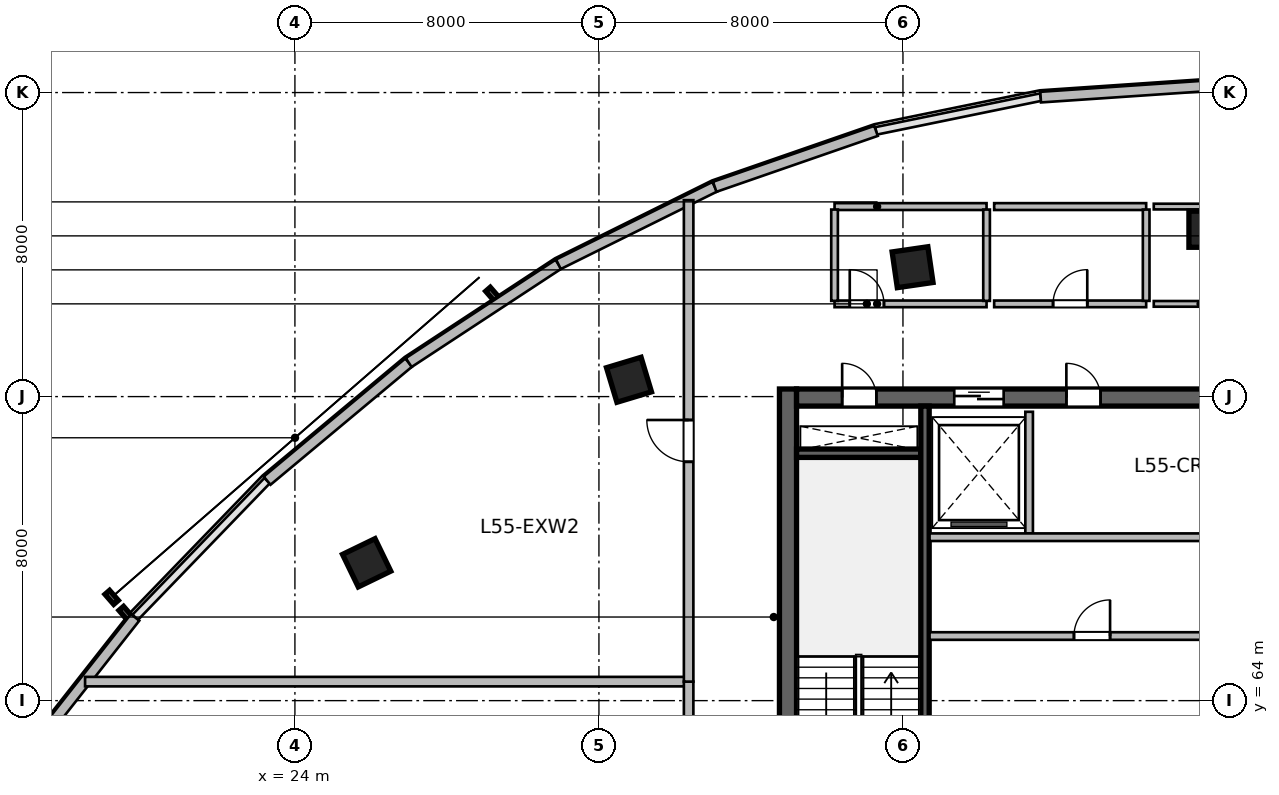
"""IFC4 building model, lengths in metres.
Left out: names, types, materials, properties, quantities, classifications, styles, units other than length and angle.
Written with IfcOpenShell. Run it as: python <this file> out.ifc"""

import sys

from ifc_helpers import new_model, si_unit, direction, frame, frame_2d, origin, origin_2d, place, context, subcontext, project, spatial, rectangle, extrude, source, transform, mapped, element, fill, save


model = new_model("IFC4")
c1 = context("Model", 3, precision=1e-05, world=origin(), true_north=direction((0.0, 1.0)))
c2 = subcontext(c1, "Body", "Model", "MODEL_VIEW")
j1 = project(units=[si_unit("LENGTHUNIT", "METRE"), si_unit("PLANEANGLEUNIT", "RADIAN")], contexts=[c1])
p1 = place(None, origin())
s1 = spatial("IfcSite", under=j1, at=p1, CompositionType="ELEMENT")
p2 = place(p1, origin())
s2 = spatial("IfcBuilding", under=s1, at=p2, CompositionType="ELEMENT")
p3 = place(p2, frame((0.0, 0.0, 227.4)))
s3 = spatial("IfcBuildingStorey", under=s2, at=p3, CompositionType="ELEMENT", Elevation=227.4)
m1 = source(origin(), c2, "Body", "SweptSolid", [
    extrude(rectangle(XDim=12.0, YDim=0.45, at=frame_2d((6.0, 0.0))), origin(), (0.0, 0.0, 1.0), 3.9),
])
p4 = place(p3, frame((36.975, 60.2, 0.0), z_axis=(0.0, 0.0, 1.0), x_axis=(0.0, 1.0, 0.0)))
e1 = element("IfcWall", 1, at=p4, inside=s3, PredefinedType="SHEAR", context=c2, shape_type="MappedRepresentation", body=[
    mapped(m1, transform((0.0, 0.0, 0.0), scale=1.0)),
])
m2 = source(origin(), c2, "Body", "SweptSolid", [
    extrude(rectangle(XDim=21.6, YDim=0.45, at=frame_2d((10.8, 0.0))), origin(), (0.0, 0.0, 1.0), 3.9),
])
p5 = place(p3, frame((37.2, 71.975, 0.0), z_axis=(0.0, 0.0, 1.0), x_axis=(1.0, 0.0, 0.0)))
e2 = element("IfcWall", 2, at=p5, inside=s3, PredefinedType="SHEAR", context=c2, shape_type="MappedRepresentation", body=[
    mapped(m2, transform((0.0, 0.0, 0.0), scale=1.0)),
])
p6 = place(p5, frame((1.2, 0.0, 0.0)))
e3 = element("IfcOpeningElement", 3, at=p6, cuts=e2, PredefinedType="OPENING", context=c2, shape_type="SweptSolid", body=[
    extrude(rectangle(XDim=0.9, YDim=2.1, at=frame_2d((0.45, 1.05))), frame((0.0, 0.235, 0.0), z_axis=(0.0, -1.0, 0.0), x_axis=(1.0, 0.0, 0.0)), (0.0, 0.0, 1.0), 0.47),
])
p7 = place(p5, frame((14.7, 0.0, 0.0)))
e4 = element("IfcOpeningElement", 4, at=p7, cuts=e2, PredefinedType="OPENING", context=c2, shape_type="SweptSolid", body=[
    extrude(rectangle(XDim=1.2, YDim=2.15, at=frame_2d((0.6, 1.075))), frame((0.0, 0.235, 0.0), z_axis=(0.0, -1.0, 0.0), x_axis=(1.0, 0.0, 0.0)), (0.0, 0.0, 1.0), 0.47),
])
p8 = place(p5, frame((4.15, 0.0, 0.0)))
e5 = element("IfcOpeningElement", 5, at=p8, cuts=e2, PredefinedType="OPENING", context=c2, shape_type="SweptSolid", body=[
    extrude(rectangle(XDim=1.3, YDim=2.15, at=frame_2d((0.65, 1.075))), frame((0.0, 0.235, 0.0), z_axis=(0.0, -1.0, 0.0), x_axis=(1.0, 0.0, 0.0)), (0.0, 0.0, 1.0), 0.47),
])
p9 = place(p5, frame((7.1, 0.0, 0.0)))
e6 = element("IfcOpeningElement", 6, at=p9, cuts=e2, PredefinedType="OPENING", context=c2, shape_type="SweptSolid", body=[
    extrude(rectangle(XDim=0.9, YDim=2.1, at=frame_2d((0.45, 1.05))), frame((0.0, 0.235, 0.0), z_axis=(0.0, -1.0, 0.0), x_axis=(1.0, 0.0, 0.0)), (0.0, 0.0, 1.0), 0.47),
])
m3 = source(origin(), c2, "Body", "SweptSolid", [
    extrude(rectangle(XDim=3.27, YDim=0.22, at=frame_2d((1.635, 0.0))), origin(), (0.0, 0.0, 1.0), 3.9),
])
p10 = place(p3, frame((37.2, 70.51, 0.0), z_axis=(0.0, 0.0, 1.0), x_axis=(1.0, 0.0, 0.0)))
e7 = element("IfcWall", 7, at=p10, inside=s3, PredefinedType="SHEAR", context=c2, shape_type="MappedRepresentation", body=[
    mapped(m3, transform((0.0, 0.0, 0.0), scale=1.0)),
])
m4 = source(origin(), c2, "Body", "SweptSolid", [
    extrude(rectangle(XDim=11.1, YDim=0.22, at=frame_2d((5.55, 0.0))), origin(), (0.0, 0.0, 1.0), 3.9),
])
p11 = place(p3, frame((40.58, 60.65, 0.0), z_axis=(0.0, 0.0, 1.0), x_axis=(0.0, 1.0, 0.0)))
e8 = element("IfcWall", 8, at=p11, inside=s3, PredefinedType="SHEAR", context=c2, shape_type="MappedRepresentation", body=[
    mapped(m4, transform((0.0, 0.0, 0.0), scale=1.0)),
])
m5 = source(origin(), c2, "Body", "SweptSolid", [
    extrude(rectangle(XDim=0.95, YDim=0.95, at=origin_2d()), origin(), (0.0, 0.0, 1.0), 3.9),
])
for number, where, z_axis, x_axis in (
    (9, (25.888, 67.627, 0.0), (0.0, 0.0, 1.0), (-0.436, 0.9, 0.0)),
    (10, (32.791, 72.442, 0.0), (0.0, 0.0, 1.0), (-0.289, 0.957, 0.0)),
    (11, (40.253, 75.404, 0.0), (0.0, 0.0, 1.0), (-0.143, 0.99, 0.0)),
    (12, (48.0, 76.404, 0.0), (0.0, 0.0, 1.0), (0.0, 1.0, 0.0)),
):
    element("IfcColumn", number, at=place(p3, frame(where, z_axis=z_axis, x_axis=x_axis)), inside=s3, PredefinedType="COLUMN", context=c2, shape_type="MappedRepresentation", body=[
        mapped(m5, transform((0.0, 0.0, 0.0), scale=1.0)),
    ])
m6 = source(origin(), c2, "Body", "SweptSolid", [
    extrude(rectangle(XDim=5.153, YDim=0.28, at=frame_2d((2.577, 0.0))), origin(), (0.0, 0.0, 1.0), 3.65),
])
p12 = place(p3, frame((16.609, 62.14, 0.0), z_axis=(0.0, 0.0, 1.0), x_axis=(0.618179283891, 0.786037132054, 0.0)))
e13 = element("IfcWall", 13, at=p12, inside=s3, PredefinedType="SOLIDWALL", context=c2, shape_type="MappedRepresentation", body=[
    mapped(m6, transform((0.0, 0.0, 0.0), scale=1.0)),
])
m7 = source(origin(), c2, "Body", "SweptSolid", [
    extrude(rectangle(XDim=4.852, YDim=0.28, at=frame_2d((2.426, 0.0))), origin(), (0.0, 0.0, 1.0), 3.65),
])
p13 = place(p3, frame((23.268, 69.788, 0.0), z_axis=(0.0, 0.0, 1.0), x_axis=(0.767936605821, 0.640525853843, 0.0)))
e14 = element("IfcWall", 14, at=p13, inside=s3, PredefinedType="SOLIDWALL", context=c2, shape_type="MappedRepresentation", body=[
    mapped(m7, transform((0.0, 0.0, 0.0), scale=1.0)),
])
m8 = source(origin(), c2, "Body", "SweptSolid", [
    extrude(rectangle(XDim=4.713, YDim=0.28, at=frame_2d((2.356, 0.0))), origin(), (0.0, 0.0, 1.0), 3.65),
])
p14 = place(p3, frame((26.994, 72.896, 0.0), z_axis=(0.0, 0.0, 1.0), x_axis=(0.835974386457, 0.548768462275, 0.0)))
e15 = element("IfcWall", 15, at=p14, inside=s3, PredefinedType="SOLIDWALL", context=c2, shape_type="MappedRepresentation", body=[
    mapped(m8, transform((0.0, 0.0, 0.0), scale=1.0)),
])
m9 = source(origin(), c2, "Body", "SweptSolid", [
    extrude(rectangle(XDim=4.59, YDim=0.28, at=frame_2d((2.295, 0.0))), origin(), (0.0, 0.0, 1.0), 3.65),
])
p15 = place(p3, frame((30.934, 75.482, 0.0), z_axis=(0.0, 0.0, 1.0), x_axis=(0.895974834987, 0.444104824418, 0.0)))
e16 = element("IfcWall", 16, at=p15, inside=s3, PredefinedType="SOLIDWALL", context=c2, shape_type="MappedRepresentation", body=[
    mapped(m9, transform((0.0, 0.0, 0.0), scale=1.0)),
])
m10 = source(origin(), c2, "Body", "SweptSolid", [
    extrude(rectangle(XDim=4.492, YDim=0.28, at=frame_2d((2.246, 0.0))), origin(), (0.0, 0.0, 1.0), 3.65),
])
p16 = place(p3, frame((35.046, 77.52, 0.0), z_axis=(0.0, 0.0, 1.0), x_axis=(0.944872297412, 0.32743906545, 0.0)))
e17 = element("IfcWall", 17, at=p16, inside=s3, PredefinedType="SOLIDWALL", context=c2, shape_type="MappedRepresentation", body=[
    mapped(m10, transform((0.0, 0.0, 0.0), scale=1.0)),
])
m11 = source(origin(), c2, "Body", "SweptSolid", [
    extrude(rectangle(XDim=4.387, YDim=0.28, at=frame_2d((2.193, 0.0))), origin(), (0.0, 0.0, 1.0), 3.65),
])
p17 = place(p3, frame((43.623, 79.879, 0.0), z_axis=(0.0, 0.0, 1.0), x_axis=(0.997703650546, 0.06773053733, 0.0)))
e18 = element("IfcWall", 18, at=p17, inside=s3, PredefinedType="SOLIDWALL", context=c2, shape_type="MappedRepresentation", body=[
    mapped(m11, transform((0.0, 0.0, 0.0), scale=1.0)),
])
m12 = source(origin(), c2, "Body", "SweptSolid", [
    extrude(rectangle(XDim=3.2, YDim=0.2, at=frame_2d((1.6, 0.0))), origin(), (0.0, 0.0, 1.0), 3.65),
])
p18 = place(p3, frame((43.32, 68.4, 0.0), z_axis=(0.0, 0.0, 1.0), x_axis=(0.0, 1.0, 0.0)))
e19 = element("IfcWall", 19, at=p18, inside=s3, PredefinedType="SOLIDWALL", context=c2, shape_type="MappedRepresentation", body=[
    mapped(m12, transform((0.0, 0.0, 0.0), scale=1.0)),
])
m13 = source(origin(), c2, "Body", "SweptSolid", [
    extrude(rectangle(XDim=8.8, YDim=0.2, at=frame_2d((4.4, 0.0))), origin(), (0.0, 0.0, 1.0), 3.65),
])
p19 = place(p3, frame((40.7, 68.3, 0.0), z_axis=(0.0, 0.0, 1.0), x_axis=(1.0, 0.0, 0.0)))
e20 = element("IfcWall", 20, at=p19, inside=s3, PredefinedType="SOLIDWALL", context=c2, shape_type="MappedRepresentation", body=[
    mapped(m13, transform((0.0, 0.0, 0.0), scale=1.0)),
])
p20 = place(p3, frame((40.7, 65.7, 0.0), z_axis=(0.0, 0.0, 1.0), x_axis=(1.0, 0.0, 0.0)))
e21 = element("IfcWall", 21, at=p20, inside=s3, PredefinedType="SOLIDWALL", context=c2, shape_type="MappedRepresentation", body=[
    mapped(m13, transform((0.0, 0.0, 0.0), scale=1.0)),
])
p21 = place(p20, frame((3.8, 0.0, 0.0)))
e22 = element("IfcOpeningElement", 22, at=p21, cuts=e21, PredefinedType="OPENING", context=c2, shape_type="SweptSolid", body=[
    extrude(rectangle(XDim=0.95, YDim=2.15, at=frame_2d((0.475, 1.075))), frame((0.0, 0.11, 0.0), z_axis=(0.0, -1.0, 0.0), x_axis=(1.0, 0.0, 0.0)), (0.0, 0.0, 1.0), 0.22),
])
m14 = source(origin(), c2, "Body", "SweptSolid", [
    extrude(rectangle(XDim=4.0, YDim=0.175, at=frame_2d((2.0, 0.0))), origin(), (0.0, 0.0, 1.0), 3.65),
])
p22 = place(p3, frame((38.2, 74.44, 0.0), z_axis=(0.0, 0.0, 1.0), x_axis=(1.0, 0.0, 0.0)))
e23 = element("IfcWall", 23, at=p22, inside=s3, PredefinedType="PARTITIONING", context=c2, shape_type="MappedRepresentation", body=[
    mapped(m14, transform((0.0, 0.0, 0.0), scale=1.0)),
])
p23 = place(p22, frame((0.4, 0.0, 0.0)))
e24 = element("IfcOpeningElement", 24, at=p23, cuts=e23, PredefinedType="OPENING", context=c2, shape_type="SweptSolid", body=[
    extrude(rectangle(XDim=0.9, YDim=2.08, at=frame_2d((0.45, 1.04))), frame((0.0, 0.098, 0.0), z_axis=(0.0, -1.0, 0.0), x_axis=(1.0, 0.0, 0.0)), (0.0, 0.0, 1.0), 0.195),
])
m15 = source(origin(), c2, "Body", "SweptSolid", [
    extrude(rectangle(XDim=4.0, YDim=0.18, at=frame_2d((2.0, 0.0))), origin(), (0.0, 0.0, 1.0), 3.65),
])
p24 = place(p3, frame((38.2, 77.0, 0.0), z_axis=(0.0, 0.0, 1.0), x_axis=(1.0, 0.0, 0.0)))
e25 = element("IfcWall", 25, at=p24, inside=s3, PredefinedType="PLUMBINGWALL", context=c2, shape_type="MappedRepresentation", body=[
    mapped(m15, transform((0.0, 0.0, 0.0), scale=1.0)),
])
m16 = source(origin(), c2, "Body", "SweptSolid", [
    extrude(rectangle(XDim=2.403, YDim=0.175, at=frame_2d((1.201, 0.0))), origin(), (0.0, 0.0, 1.0), 3.65),
])
for number, where, z_axis, x_axis in (
    (26, (38.2, 74.519, 0.0), (0.0, 0.0, 1.0), (0.0, 1.0, 0.0)),
    (27, (42.2, 74.519, 0.0), (0.0, 0.0, 1.0), (0.0, 1.0, 0.0)),
):
    element("IfcWall", number, at=place(p3, frame(where, z_axis=z_axis, x_axis=x_axis)), inside=s3, PredefinedType="PARTITIONING", context=c2, shape_type="MappedRepresentation", body=[
        mapped(m16, transform((0.0, 0.0, 0.0), scale=1.0)),
    ])
p25 = place(p3, frame((42.4, 74.44, 0.0), z_axis=(0.0, 0.0, 1.0), x_axis=(1.0, 0.0, 0.0)))
e28 = element("IfcWall", 28, at=p25, inside=s3, PredefinedType="PARTITIONING", context=c2, shape_type="MappedRepresentation", body=[
    mapped(m14, transform((0.0, 0.0, 0.0), scale=1.0)),
])
p26 = place(p25, frame((1.55, 0.0, 0.0)))
e29 = element("IfcOpeningElement", 29, at=p26, cuts=e28, PredefinedType="OPENING", context=c2, shape_type="SweptSolid", body=[
    extrude(rectangle(XDim=0.9, YDim=2.08, at=frame_2d((0.45, 1.04))), frame((0.0, 0.098, 0.0), z_axis=(0.0, -1.0, 0.0), x_axis=(1.0, 0.0, 0.0)), (0.0, 0.0, 1.0), 0.195),
])
p27 = place(p3, frame((42.4, 77.0, 0.0), z_axis=(0.0, 0.0, 1.0), x_axis=(1.0, 0.0, 0.0)))
e30 = element("IfcWall", 30, at=p27, inside=s3, PredefinedType="PLUMBINGWALL", context=c2, shape_type="MappedRepresentation", body=[
    mapped(m15, transform((0.0, 0.0, 0.0), scale=1.0)),
])
p28 = place(p3, frame((46.4, 74.519, 0.0), z_axis=(0.0, 0.0, 1.0), x_axis=(0.0, 1.0, 0.0)))
e31 = element("IfcWall", 31, at=p28, inside=s3, PredefinedType="PARTITIONING", context=c2, shape_type="MappedRepresentation", body=[
    mapped(m16, transform((0.0, 0.0, 0.0), scale=1.0)),
])
m17 = source(origin(), c2, "Body", "SweptSolid", [
    extrude(rectangle(XDim=4.4, YDim=0.15, at=frame_2d((2.2, 0.0))), origin(), (0.0, 0.0, 1.0), 3.65),
])
p29 = place(p3, frame((46.6, 74.44, 0.0), z_axis=(0.0, 0.0, 1.0), x_axis=(1.0, 0.0, 0.0)))
e32 = element("IfcWall", 32, at=p29, inside=s3, PredefinedType="PARTITIONING", context=c2, shape_type="MappedRepresentation", body=[
    mapped(m17, transform((0.0, 0.0, 0.0), scale=1.0)),
])
p30 = place(p29, frame((1.725, 0.0, 0.0)))
e33 = element("IfcOpeningElement", 33, at=p30, cuts=e32, PredefinedType="OPENING", context=c2, shape_type="SweptSolid", body=[
    extrude(rectangle(XDim=0.95, YDim=2.1, at=frame_2d((0.475, 1.05))), frame((0.0, 0.085, 0.0), z_axis=(0.0, -1.0, 0.0), x_axis=(1.0, 0.0, 0.0)), (0.0, 0.0, 1.0), 0.17),
])
p31 = place(p3, frame((46.6, 77.0, 0.0), z_axis=(0.0, 0.0, 1.0), x_axis=(1.0, 0.0, 0.0)))
e34 = element("IfcWall", 34, at=p31, inside=s3, PredefinedType="PARTITIONING", context=c2, shape_type="MappedRepresentation", body=[
    mapped(m17, transform((0.0, 0.0, 0.0), scale=1.0)),
])
m18 = source(origin(), c2, "Body", "SweptSolid", [
    extrude(rectangle(XDim=15.882, YDim=0.25, at=frame_2d((7.941, 0.0))), origin(), (0.0, 0.0, 1.0), 3.65),
])
p32 = place(p3, frame((18.478, 64.5, 0.0), z_axis=(0.0, 0.0, 1.0), x_axis=(1.0, 0.0, 0.0)))
e35 = element("IfcWall", 35, at=p32, inside=s3, PredefinedType="PARTITIONING", context=c2, shape_type="MappedRepresentation", body=[
    mapped(m18, transform((0.0, 0.0, 0.0), scale=1.0)),
])
m19 = source(origin(), c2, "Body", "SweptSolid", [
    extrude(rectangle(XDim=6.54, YDim=0.25, at=frame_2d((3.27, 0.0))), origin(), (0.0, 0.0, 1.0), 3.65),
])
p33 = place(p3, frame((34.36, 57.96, 0.0), z_axis=(0.0, 0.0, 1.0), x_axis=(0.0, 1.0, 0.0)))
e36 = element("IfcWall", 36, at=p33, inside=s3, PredefinedType="PARTITIONING", context=c2, shape_type="MappedRepresentation", body=[
    mapped(m19, transform((0.0, 0.0, 0.0), scale=1.0)),
])
p34 = place(p33, frame((2.72, 0.0, 0.0)))
e37 = element("IfcOpeningElement", 37, at=p34, cuts=e36, PredefinedType="OPENING", context=c2, shape_type="SweptSolid", body=[
    extrude(rectangle(XDim=1.1, YDim=2.15, at=frame_2d((0.55, 1.075))), frame((0.0, 0.135, 0.0), z_axis=(0.0, -1.0, 0.0), x_axis=(1.0, 0.0, 0.0)), (0.0, 0.0, 1.0), 0.27),
])
m20 = source(origin(), c2, "Body", "SweptSolid", [
    extrude(rectangle(XDim=12.669, YDim=0.25, at=frame_2d((6.334, 0.0))), origin(), (0.0, 0.0, 1.0), 3.65),
])
p35 = place(p3, frame((34.36, 64.5, 0.0), z_axis=(0.0, 0.0, 1.0), x_axis=(0.0, 1.0, 0.0)))
e38 = element("IfcWall", 38, at=p35, inside=s3, PredefinedType="PARTITIONING", context=c2, shape_type="MappedRepresentation", body=[
    mapped(m20, transform((0.0, 0.0, 0.0), scale=1.0)),
])
p36 = place(p35, frame((5.784, 0.0, 0.0)))
e39 = element("IfcOpeningElement", 39, at=p36, cuts=e38, PredefinedType="OPENING", context=c2, shape_type="SweptSolid", body=[
    extrude(rectangle(XDim=1.1, YDim=2.15, at=frame_2d((0.55, 1.075))), frame((0.0, 0.135, 0.0), z_axis=(0.0, -1.0, 0.0), x_axis=(1.0, 0.0, 0.0)), (0.0, 0.0, 1.0), 0.27),
])
m21 = source(origin(), c2, "Body", "SweptSolid", [
    extrude(rectangle(XDim=0.9, YDim=2.1, at=frame_2d((0.45, 1.05))), frame((0.0, 0.025, 0.0), z_axis=(0.0, -1.0, 0.0), x_axis=(1.0, 0.0, 0.0)), (0.0, 0.0, 1.0), 0.05),
])
p37 = place(p6, origin())
e40 = element("IfcDoor", 40, at=p37, inside=s3, OperationType="SINGLE_SWING_LEFT", PredefinedType="DOOR", context=c2, shape_type="MappedRepresentation", body=[
    mapped(m21, transform((0.0, 0.0, 0.0), scale=1.0)),
])
fill(e3, e40)
m22 = source(origin(), c2, "Body", "SweptSolid", [
    extrude(rectangle(XDim=1.3, YDim=2.15, at=frame_2d((0.65, 1.075))), frame((0.0, 0.025, 0.0), z_axis=(0.0, -1.0, 0.0), x_axis=(1.0, 0.0, 0.0)), (0.0, 0.0, 1.0), 0.05),
])
p38 = place(p8, origin())
e41 = element("IfcDoor", 41, at=p38, inside=s3, OperationType="DOUBLE_DOOR_SLIDING", PredefinedType="DOOR", context=c2, shape_type="MappedRepresentation", body=[
    mapped(m22, transform((0.0, 0.0, 0.0), scale=1.0)),
])
fill(e5, e41)
p39 = place(p9, origin())
e42 = element("IfcDoor", 42, at=p39, inside=s3, OperationType="SINGLE_SWING_LEFT", PredefinedType="DOOR", context=c2, shape_type="MappedRepresentation", body=[
    mapped(m21, transform((0.0, 0.0, 0.0), scale=1.0)),
])
fill(e6, e42)
m23 = source(origin(), c2, "Body", "SweptSolid", [
    extrude(rectangle(XDim=0.95, YDim=2.15, at=frame_2d((0.475, 1.075))), frame((0.0, 0.025, 0.0), z_axis=(0.0, -1.0, 0.0), x_axis=(1.0, 0.0, 0.0)), (0.0, 0.0, 1.0), 0.05),
])
p40 = place(p21, origin())
e43 = element("IfcDoor", 43, at=p40, inside=s3, OperationType="SINGLE_SWING_RIGHT", PredefinedType="DOOR", context=c2, shape_type="MappedRepresentation", body=[
    mapped(m23, transform((0.0, 0.0, 0.0), scale=1.0)),
])
fill(e22, e43)
m24 = source(origin(), c2, "Body", "SweptSolid", [
    extrude(rectangle(XDim=0.9, YDim=2.08, at=frame_2d((0.45, 1.04))), frame((0.0, 0.025, 0.0), z_axis=(0.0, -1.0, 0.0), x_axis=(1.0, 0.0, 0.0)), (0.0, 0.0, 1.0), 0.05),
])
p41 = place(p23, origin())
e44 = element("IfcDoor", 44, at=p41, inside=s3, OperationType="SINGLE_SWING_LEFT", PredefinedType="DOOR", context=c2, shape_type="MappedRepresentation", body=[
    mapped(m24, transform((0.0, 0.0, 0.0), scale=1.0)),
])
fill(e24, e44)
p42 = place(p26, origin())
e45 = element("IfcDoor", 45, at=p42, inside=s3, OperationType="SINGLE_SWING_RIGHT", PredefinedType="DOOR", context=c2, shape_type="MappedRepresentation", body=[
    mapped(m24, transform((0.0, 0.0, 0.0), scale=1.0)),
])
fill(e29, e45)
m25 = source(origin(), c2, "Body", "SweptSolid", [
    extrude(rectangle(XDim=1.1, YDim=2.15, at=frame_2d((0.55, 1.075))), frame((0.0, 0.025, 0.0), z_axis=(0.0, -1.0, 0.0), x_axis=(1.0, 0.0, 0.0)), (0.0, 0.0, 1.0), 0.05),
])
p43 = place(p36, origin())
e46 = element("IfcDoor", 46, at=p43, inside=s3, OperationType="SINGLE_SWING_RIGHT", PredefinedType="DOOR", context=c2, shape_type="MappedRepresentation", body=[
    mapped(m25, transform((0.0, 0.0, 0.0), scale=1.0)),
])
fill(e39, e46)
save(model, sys.argv[1])
